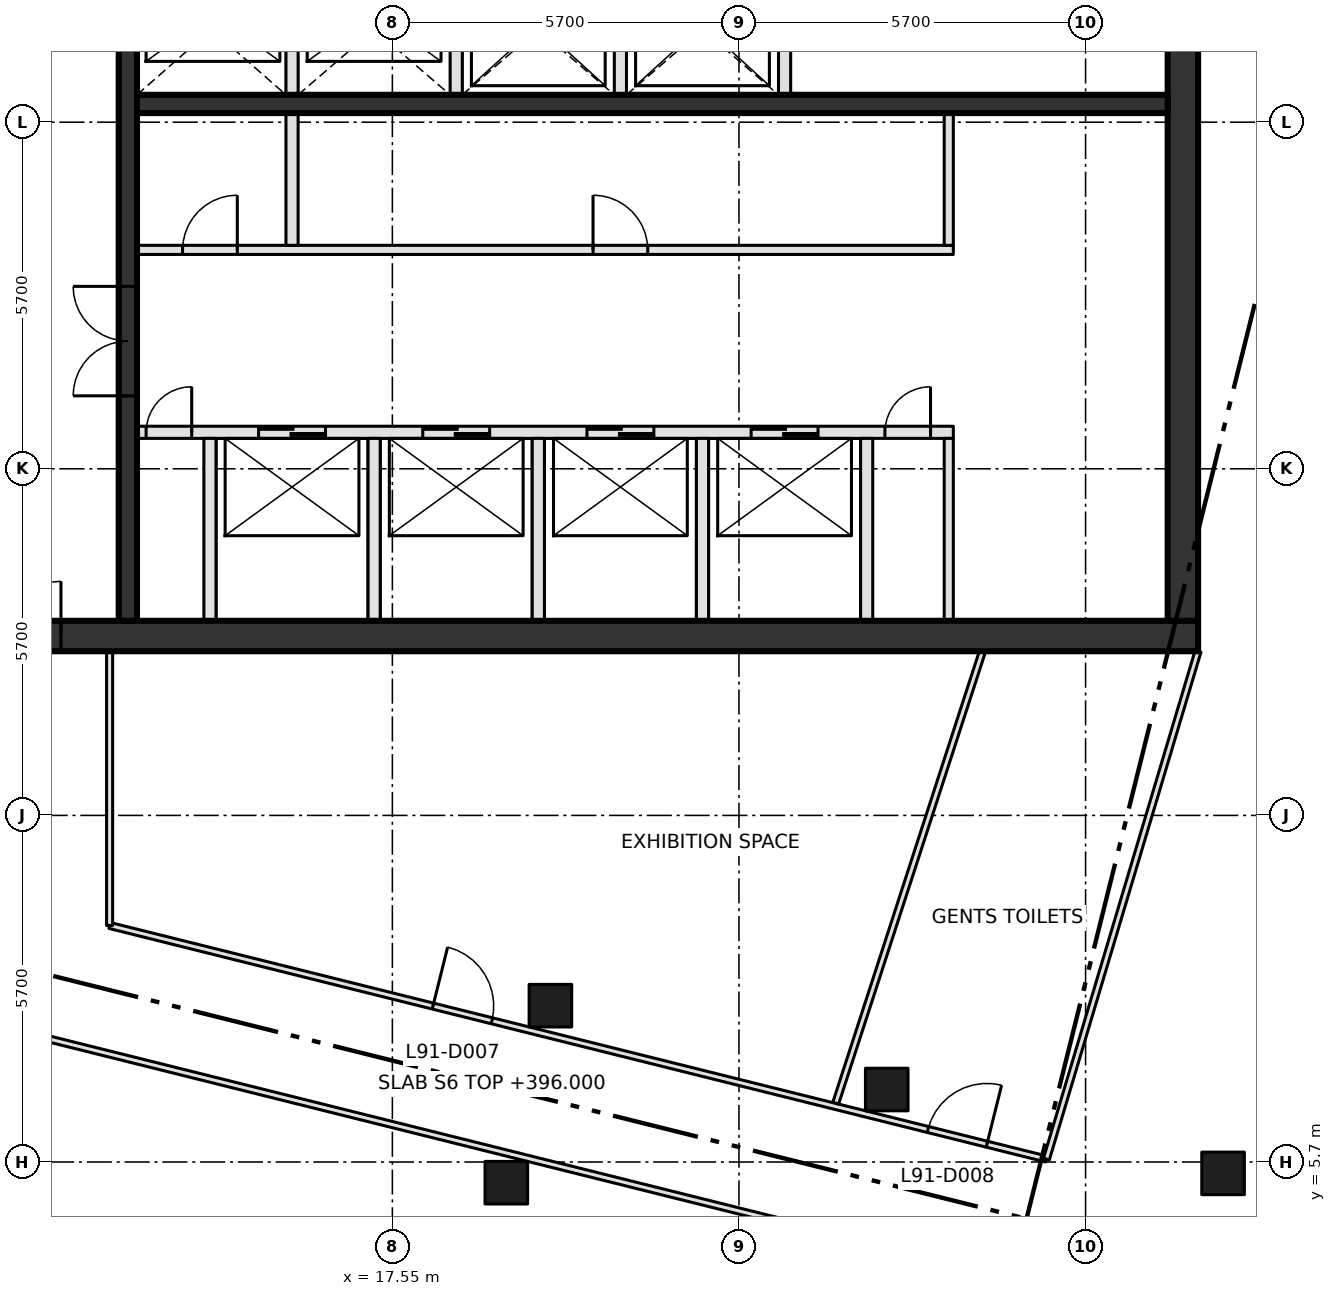
"""IFC4 building model, lengths in metres.
Left out: names, types, materials, properties, quantities, classifications, styles, units other than length and angle.
Written with IfcOpenShell. Run it as: python <this file> out.ifc"""

import sys

from ifc_helpers import new_model, si_unit, direction, frame, frame_2d, origin, origin_2d, place, context, subcontext, project, spatial, rectangle, extrude, element, fill, save


model = new_model("IFC4")
c1 = context("Model", 3, precision=1e-05, world=origin(), true_north=direction((0.0, 1.0)))
c2 = subcontext(c1, "Body", "Model", "MODEL_VIEW")
j1 = project(units=[si_unit("LENGTHUNIT", "METRE"), si_unit("PLANEANGLEUNIT", "RADIAN")], contexts=[c1])
p1 = place(None, origin())
s1 = spatial("IfcSite", under=j1, at=p1, CompositionType="ELEMENT")
p2 = place(p1, origin())
s2 = spatial("IfcBuilding", under=s1, at=p2, CompositionType="ELEMENT")
p3 = place(p2, frame((0.0, 0.0, 396.0)))
s3 = spatial("IfcBuildingStorey", under=s2, at=p3, CompositionType="ELEMENT", Elevation=396.0)
for number, where, z_axis, x_axis in (
    (1, (19.424, 5.36, 0.0), (0.0, 0.0, 1.0), (1.0, 0.0, 0.0)),
    (2, (20.149, 8.271, 0.0), (0.0, 0.0, 1.0), (1.0, 0.0, 0.0)),
    (3, (25.68, 6.892, 0.0), (0.0, 0.0, 1.0), (1.0, 0.0, 0.0)),
    (4, (31.211, 5.513, 0.0), (0.0, 0.0, 1.0), (1.0, 0.0, 0.0)),
):
    element("IfcColumn", number, at=place(p3, frame(where, z_axis=z_axis, x_axis=x_axis)), inside=s3, PredefinedType="COLUMN", context=c2, shape_type="SweptSolid", body=[
        extrude(rectangle(XDim=0.7, YDim=0.7, at=origin_2d()), origin(), (0.0, 0.0, 1.0), 4.2),
    ])
p4 = place(p3, frame((8.0, 14.35, -0.3), z_axis=(0.0, 0.0, 1.0), x_axis=(1.0, 0.0, 0.0)))
e5 = element("IfcWall", 5, at=p4, inside=s3, PredefinedType="SHEAR", context=c2, shape_type="SweptSolid", body=[
    extrude(rectangle(XDim=22.8, YDim=0.5, at=frame_2d((11.4, 0.0))), origin(), (0.0, 0.0, 1.0), 4.05),
])
p5 = place(p4, frame((2.3, 0.0, 0.3)))
e6 = element("IfcOpeningElement", 6, at=p5, cuts=e5, PredefinedType="OPENING", context=c2, shape_type="SweptSolid", body=[
    extrude(rectangle(XDim=1.8, YDim=2.1, at=frame_2d((0.9, 1.05))), frame((0.0, 0.26, 0.0), z_axis=(0.0, -1.0, 0.0), x_axis=(1.0, 0.0, 0.0)), (0.0, 0.0, 1.0), 0.52),
])
p6 = place(p3, frame((30.55, 14.6, -0.3), z_axis=(0.0, 0.0, 1.0), x_axis=(0.0, 1.0, 0.0)))
e7 = element("IfcWall", 7, at=p6, inside=s3, PredefinedType="SHEAR", context=c2, shape_type="SweptSolid", body=[
    extrude(rectangle(XDim=21.1, YDim=0.5, at=frame_2d((10.55, 0.0))), origin(), (0.0, 0.0, 1.0), 4.05),
])
p7 = place(p3, frame((13.35, 17.7, 0.0), z_axis=(0.0, 0.0, 1.0), x_axis=(1.0, 0.0, 0.0)))
e8 = element("IfcWall", 8, at=p7, inside=s3, PredefinedType="SOLIDWALL", context=c2, shape_type="SweptSolid", body=[
    extrude(rectangle(XDim=13.425, YDim=0.2, at=frame_2d((6.712, 0.0))), origin(), (0.0, 0.0, 1.0), 3.75),
])
p8 = place(p7, frame((2.0, 0.0, 0.0)))
e9 = element("IfcOpeningElement", 9, at=p8, cuts=e8, PredefinedType="OPENING", context=c2, shape_type="SweptSolid", body=[
    extrude(rectangle(XDim=1.1, YDim=2.1, at=frame_2d((0.55, 1.05))), frame((0.0, 0.11, 0.0), z_axis=(0.0, -1.0, 0.0), x_axis=(1.0, 0.0, 0.0)), (0.0, 0.0, 1.0), 0.22),
])
p9 = place(p7, frame((4.7, 0.0, 0.0)))
e10 = element("IfcOpeningElement", 10, at=p9, cuts=e8, PredefinedType="OPENING", context=c2, shape_type="SweptSolid", body=[
    extrude(rectangle(XDim=1.1, YDim=2.1, at=frame_2d((0.55, 1.05))), frame((0.0, 0.11, 0.0), z_axis=(0.0, -1.0, 0.0), x_axis=(1.0, 0.0, 0.0)), (0.0, 0.0, 1.0), 0.22),
])
p10 = place(p7, frame((7.4, 0.0, 0.0)))
e11 = element("IfcOpeningElement", 11, at=p10, cuts=e8, PredefinedType="OPENING", context=c2, shape_type="SweptSolid", body=[
    extrude(rectangle(XDim=1.1, YDim=2.1, at=frame_2d((0.55, 1.05))), frame((0.0, 0.11, 0.0), z_axis=(0.0, -1.0, 0.0), x_axis=(1.0, 0.0, 0.0)), (0.0, 0.0, 1.0), 0.22),
])
p11 = place(p7, frame((10.1, 0.0, 0.0)))
e12 = element("IfcOpeningElement", 12, at=p11, cuts=e8, PredefinedType="OPENING", context=c2, shape_type="SweptSolid", body=[
    extrude(rectangle(XDim=1.1, YDim=2.1, at=frame_2d((0.55, 1.05))), frame((0.0, 0.11, 0.0), z_axis=(0.0, -1.0, 0.0), x_axis=(1.0, 0.0, 0.0)), (0.0, 0.0, 1.0), 0.22),
])
p12 = place(p7, frame((0.15, 0.0, 0.0)))
e13 = element("IfcOpeningElement", 13, at=p12, cuts=e8, PredefinedType="OPENING", context=c2, shape_type="SweptSolid", body=[
    extrude(rectangle(XDim=0.75, YDim=2.1, at=frame_2d((0.375, 1.05))), frame((0.0, 0.11, 0.0), z_axis=(0.0, -1.0, 0.0), x_axis=(1.0, 0.0, 0.0)), (0.0, 0.0, 1.0), 0.22),
])
p13 = place(p7, frame((12.3, 0.0, 0.0)))
e14 = element("IfcOpeningElement", 14, at=p13, cuts=e8, PredefinedType="OPENING", context=c2, shape_type="SweptSolid", body=[
    extrude(rectangle(XDim=0.75, YDim=2.1, at=frame_2d((0.375, 1.05))), frame((0.0, 0.11, 0.0), z_axis=(0.0, -1.0, 0.0), x_axis=(1.0, 0.0, 0.0)), (0.0, 0.0, 1.0), 0.22),
])
p14 = place(p3, frame((13.35, 20.7, 0.0), z_axis=(0.0, 0.0, 1.0), x_axis=(1.0, 0.0, 0.0)))
e15 = element("IfcWall", 15, at=p14, inside=s3, PredefinedType="PARTITIONING", context=c2, shape_type="SweptSolid", body=[
    extrude(rectangle(XDim=13.425, YDim=0.15, at=frame_2d((6.712, 0.0))), origin(), (0.0, 0.0, 1.0), 3.75),
])
p15 = place(p14, frame((0.75, 0.0, 0.0)))
e16 = element("IfcOpeningElement", 16, at=p15, cuts=e15, PredefinedType="OPENING", context=c2, shape_type="SweptSolid", body=[
    extrude(rectangle(XDim=0.9, YDim=2.1, at=frame_2d((0.45, 1.05))), frame((0.0, 0.085, 0.0), z_axis=(0.0, -1.0, 0.0), x_axis=(1.0, 0.0, 0.0)), (0.0, 0.0, 1.0), 0.17),
])
p16 = place(p14, frame((7.5, 0.0, 0.0)))
e17 = element("IfcOpeningElement", 17, at=p16, cuts=e15, PredefinedType="OPENING", context=c2, shape_type="SweptSolid", body=[
    extrude(rectangle(XDim=0.9, YDim=2.1, at=frame_2d((0.45, 1.05))), frame((0.0, 0.085, 0.0), z_axis=(0.0, -1.0, 0.0), x_axis=(1.0, 0.0, 0.0)), (0.0, 0.0, 1.0), 0.17),
])
p17 = place(p3, frame((13.35, 23.1, 0.0), z_axis=(0.0, 0.0, 1.0), x_axis=(1.0, 0.0, 0.0)))
e18 = element("IfcWall", 18, at=p17, inside=s3, PredefinedType="SHEAR", context=c2, shape_type="SweptSolid", body=[
    extrude(rectangle(XDim=16.95, YDim=0.3, at=frame_2d((8.475, 0.0))), origin(), (0.0, 0.0, 1.0), 3.75),
])
p18 = place(p3, frame((13.2, 14.6, 0.0), z_axis=(0.0, 0.0, 1.0), x_axis=(0.0, 1.0, 0.0)))
e19 = element("IfcWall", 19, at=p18, inside=s3, PredefinedType="SHEAR", context=c2, shape_type="SweptSolid", body=[
    extrude(rectangle(XDim=21.1, YDim=0.3, at=frame_2d((10.55, 0.0))), origin(), (0.0, 0.0, 1.0), 3.75),
])
p19 = place(p18, frame((3.7, 0.0, 0.0)))
e20 = element("IfcOpeningElement", 20, at=p19, cuts=e19, PredefinedType="OPENING", context=c2, shape_type="SweptSolid", body=[
    extrude(rectangle(XDim=1.8, YDim=2.1, at=frame_2d((0.9, 1.05))), frame((0.0, 0.16, 0.0), z_axis=(0.0, -1.0, 0.0), x_axis=(1.0, 0.0, 0.0)), (0.0, 0.0, 1.0), 0.32),
])
p20 = place(p18, frame((11.8, 0.0, 0.0)))
e21 = element("IfcOpeningElement", 21, at=p20, cuts=e19, PredefinedType="OPENING", context=c2, shape_type="SweptSolid", body=[
    extrude(rectangle(XDim=1.2, YDim=2.1, at=frame_2d((0.6, 1.05))), frame((0.0, 0.16, 0.0), z_axis=(0.0, -1.0, 0.0), x_axis=(1.0, 0.0, 0.0)), (0.0, 0.0, 1.0), 0.32),
])
p21 = place(p3, frame((14.55, 14.6, 0.0), z_axis=(0.0, 0.0, 1.0), x_axis=(0.0, 1.0, 0.0)))
e22 = element("IfcWall", 22, at=p21, inside=s3, PredefinedType="SOLIDWALL", context=c2, shape_type="SweptSolid", body=[
    extrude(rectangle(XDim=3.0, YDim=0.2, at=frame_2d((1.5, 0.0))), origin(), (0.0, 0.0, 1.0), 3.75),
])
p22 = place(p3, frame((15.9, 20.775, 0.0), z_axis=(0.0, 0.0, 1.0), x_axis=(0.0, 1.0, 0.0)))
e23 = element("IfcWall", 23, at=p22, inside=s3, PredefinedType="SOLIDWALL", context=c2, shape_type="SweptSolid", body=[
    extrude(rectangle(XDim=4.625, YDim=0.2, at=frame_2d((2.312, 0.0))), origin(), (0.0, 0.0, 1.0), 3.75),
])
p23 = place(p3, frame((17.25, 14.6, 0.0), z_axis=(0.0, 0.0, 1.0), x_axis=(0.0, 1.0, 0.0)))
e24 = element("IfcWall", 24, at=p23, inside=s3, PredefinedType="SOLIDWALL", context=c2, shape_type="SweptSolid", body=[
    extrude(rectangle(XDim=3.0, YDim=0.2, at=frame_2d((1.5, 0.0))), origin(), (0.0, 0.0, 1.0), 3.75),
])
p24 = place(p3, frame((18.6, 23.25, 0.0), z_axis=(0.0, 0.0, 1.0), x_axis=(0.0, 1.0, 0.0)))
e25 = element("IfcWall", 25, at=p24, inside=s3, PredefinedType="SOLIDWALL", context=c2, shape_type="SweptSolid", body=[
    extrude(rectangle(XDim=5.15, YDim=0.2, at=frame_2d((2.575, 0.0))), origin(), (0.0, 0.0, 1.0), 3.75),
])
p25 = place(p24, frame((3.15, 0.0, 0.0)))
e26 = element("IfcOpeningElement", 26, at=p25, cuts=e25, PredefinedType="OPENING", context=c2, shape_type="SweptSolid", body=[
    extrude(rectangle(XDim=1.2, YDim=2.1, at=frame_2d((0.6, 1.05))), frame((0.0, 0.11, 0.0), z_axis=(0.0, -1.0, 0.0), x_axis=(1.0, 0.0, 0.0)), (0.0, 0.0, 1.0), 0.22),
])
p26 = place(p3, frame((19.95, 14.6, 0.0), z_axis=(0.0, 0.0, 1.0), x_axis=(0.0, 1.0, 0.0)))
e27 = element("IfcWall", 27, at=p26, inside=s3, PredefinedType="SOLIDWALL", context=c2, shape_type="SweptSolid", body=[
    extrude(rectangle(XDim=3.0, YDim=0.2, at=frame_2d((1.5, 0.0))), origin(), (0.0, 0.0, 1.0), 3.75),
])
p27 = place(p3, frame((21.3, 23.25, 0.0), z_axis=(0.0, 0.0, 1.0), x_axis=(0.0, 1.0, 0.0)))
e28 = element("IfcWall", 28, at=p27, inside=s3, PredefinedType="SOLIDWALL", context=c2, shape_type="SweptSolid", body=[
    extrude(rectangle(XDim=2.15, YDim=0.2, at=frame_2d((1.075, 0.0))), origin(), (0.0, 0.0, 1.0), 3.75),
])
p28 = place(p3, frame((22.65, 14.6, 0.0), z_axis=(0.0, 0.0, 1.0), x_axis=(0.0, 1.0, 0.0)))
e29 = element("IfcWall", 29, at=p28, inside=s3, PredefinedType="SOLIDWALL", context=c2, shape_type="SweptSolid", body=[
    extrude(rectangle(XDim=3.0, YDim=0.2, at=frame_2d((1.5, 0.0))), origin(), (0.0, 0.0, 1.0), 3.75),
])
p29 = place(p3, frame((24.0, 23.25, 0.0), z_axis=(0.0, 0.0, 1.0), x_axis=(0.0, 1.0, 0.0)))
e30 = element("IfcWall", 30, at=p29, inside=s3, PredefinedType="SOLIDWALL", context=c2, shape_type="SweptSolid", body=[
    extrude(rectangle(XDim=2.15, YDim=0.2, at=frame_2d((1.075, 0.0))), origin(), (0.0, 0.0, 1.0), 3.75),
])
p30 = place(p3, frame((25.35, 14.6, 0.0), z_axis=(0.0, 0.0, 1.0), x_axis=(0.0, 1.0, 0.0)))
e31 = element("IfcWall", 31, at=p30, inside=s3, PredefinedType="SOLIDWALL", context=c2, shape_type="SweptSolid", body=[
    extrude(rectangle(XDim=3.0, YDim=0.2, at=frame_2d((1.5, 0.0))), origin(), (0.0, 0.0, 1.0), 3.75),
])
p31 = place(p3, frame((26.7, 14.6, 0.0), z_axis=(0.0, 0.0, 1.0), x_axis=(0.0, 1.0, 0.0)))
e32 = element("IfcWall", 32, at=p31, inside=s3, PredefinedType="PARTITIONING", context=c2, shape_type="SweptSolid", body=[
    extrude(rectangle(XDim=3.0, YDim=0.15, at=frame_2d((1.5, 0.0))), origin(), (0.0, 0.0, 1.0), 3.75),
])
p32 = place(p3, frame((26.7, 20.775, 0.0), z_axis=(0.0, 0.0, 1.0), x_axis=(0.0, 1.0, 0.0)))
e33 = element("IfcWall", 33, at=p32, inside=s3, PredefinedType="PARTITIONING", context=c2, shape_type="SweptSolid", body=[
    extrude(rectangle(XDim=2.175, YDim=0.15, at=frame_2d((1.087, 0.0))), origin(), (0.0, 0.0, 1.0), 3.75),
])
p33 = place(p3, frame((8.521, 8.567, 0.0), z_axis=(0.0, 0.0, 1.0), x_axis=(0.970298072542, -0.241912485047, 0.0)))
e34 = element("IfcWall", 34, at=p33, inside=s3, PredefinedType="PARTITIONING", context=c2, shape_type="SweptSolid", body=[
    extrude(rectangle(XDim=39.274, YDim=0.1, at=frame_2d((19.637, 0.0))), origin(), (0.0, 0.0, 1.0), 3.75),
])
p34 = place(p33, frame((24.848, 0.0, 0.0)))
e35 = element("IfcOpeningElement", 35, at=p34, cuts=e34, PredefinedType="OPENING", context=c2, shape_type="SweptSolid", body=[
    extrude(rectangle(XDim=1.8, YDim=2.1, at=frame_2d((0.9, 1.05))), frame((0.0, 0.06, 0.0), z_axis=(0.0, -1.0, 0.0), x_axis=(1.0, 0.0, 0.0)), (0.0, 0.0, 1.0), 0.12),
])
p35 = place(p33, frame((30.448, 0.0, 0.0)))
e36 = element("IfcOpeningElement", 36, at=p35, cuts=e34, PredefinedType="OPENING", context=c2, shape_type="SweptSolid", body=[
    extrude(rectangle(XDim=1.0, YDim=2.1, at=frame_2d((0.5, 1.05))), frame((0.0, 0.06, 0.0), z_axis=(0.0, -1.0, 0.0), x_axis=(1.0, 0.0, 0.0)), (0.0, 0.0, 1.0), 0.12),
])
p36 = place(p3, frame((12.9, 9.59, 0.0), z_axis=(0.0, 0.0, 1.0), x_axis=(0.970296971371, -0.241916901741, 0.0)))
e37 = element("IfcWall", 37, at=p36, inside=s3, PredefinedType="PARTITIONING", context=c2, shape_type="SweptSolid", body=[
    extrude(rectangle(XDim=15.878, YDim=0.1, at=frame_2d((7.939, 0.0))), origin(), (0.0, 0.0, 1.0), 3.75),
])
p37 = place(p36, frame((5.48, 0.0, 0.0)))
e38 = element("IfcOpeningElement", 38, at=p37, cuts=e37, PredefinedType="OPENING", context=c2, shape_type="SweptSolid", body=[
    extrude(rectangle(XDim=1.0, YDim=2.1, at=frame_2d((0.5, 1.05))), frame((0.0, 0.06, 0.0), z_axis=(0.0, -1.0, 0.0), x_axis=(1.0, 0.0, 0.0)), (0.0, 0.0, 1.0), 0.12),
])
p38 = place(p36, frame((13.869, 0.0, 0.0)))
e39 = element("IfcOpeningElement", 39, at=p38, cuts=e37, PredefinedType="OPENING", context=c2, shape_type="SweptSolid", body=[
    extrude(rectangle(XDim=1.0, YDim=2.1, at=frame_2d((0.5, 1.05))), frame((0.0, 0.06, 0.0), z_axis=(0.0, -1.0, 0.0), x_axis=(1.0, 0.0, 0.0)), (0.0, 0.0, 1.0), 0.12),
])
p39 = place(p3, frame((12.9, 9.59, 0.0), z_axis=(0.0, 0.0, 1.0), x_axis=(0.0, 1.0, 0.0)))
e40 = element("IfcWall", 40, at=p39, inside=s3, PredefinedType="PARTITIONING", context=c2, shape_type="SweptSolid", body=[
    extrude(rectangle(XDim=4.51, YDim=0.1, at=frame_2d((2.255, 0.0))), origin(), (0.0, 0.0, 1.0), 3.75),
])
p40 = place(p3, frame((30.8, 14.1, 0.0), z_axis=(0.0, 0.0, 1.0), x_axis=(-0.286170650389, -0.958178667502, 0.0)))
e41 = element("IfcWall", 41, at=p40, inside=s3, PredefinedType="PARTITIONING", context=c2, shape_type="SweptSolid", body=[
    extrude(rectangle(XDim=8.716, YDim=0.1, at=frame_2d((4.358, 0.0))), origin(), (0.0, 0.0, 1.0), 3.75),
])
p41 = place(p3, frame((24.841, 6.668, 0.0), z_axis=(0.0, 0.0, 1.0), x_axis=(0.308898149954, 0.951095122979, 0.0)))
e42 = element("IfcWall", 42, at=p41, inside=s3, PredefinedType="PARTITIONING", context=c2, shape_type="SweptSolid", body=[
    extrude(rectangle(XDim=7.814, YDim=0.1, at=frame_2d((3.907, 0.0))), origin(), (0.0, 0.0, 1.0), 3.75),
])
p42 = place(p8, origin())
e43 = element("IfcDoor", 43, at=p42, inside=s3, OperationType="SLIDING_TO_LEFT", PredefinedType="DOOR", context=c2, shape_type="SweptSolid", body=[
    extrude(rectangle(XDim=1.1, YDim=2.1, at=frame_2d((0.55, 1.05))), frame((0.0, 0.025, 0.0), z_axis=(0.0, -1.0, 0.0), x_axis=(1.0, 0.0, 0.0)), (0.0, 0.0, 1.0), 0.05),
])
fill(e9, e43)
p43 = place(p9, origin())
e44 = element("IfcDoor", 44, at=p43, inside=s3, OperationType="SLIDING_TO_LEFT", PredefinedType="DOOR", context=c2, shape_type="SweptSolid", body=[
    extrude(rectangle(XDim=1.1, YDim=2.1, at=frame_2d((0.55, 1.05))), frame((0.0, 0.025, 0.0), z_axis=(0.0, -1.0, 0.0), x_axis=(1.0, 0.0, 0.0)), (0.0, 0.0, 1.0), 0.05),
])
fill(e10, e44)
p44 = place(p10, origin())
e45 = element("IfcDoor", 45, at=p44, inside=s3, OperationType="SLIDING_TO_LEFT", PredefinedType="DOOR", context=c2, shape_type="SweptSolid", body=[
    extrude(rectangle(XDim=1.1, YDim=2.1, at=frame_2d((0.55, 1.05))), frame((0.0, 0.025, 0.0), z_axis=(0.0, -1.0, 0.0), x_axis=(1.0, 0.0, 0.0)), (0.0, 0.0, 1.0), 0.05),
])
fill(e11, e45)
p45 = place(p11, origin())
e46 = element("IfcDoor", 46, at=p45, inside=s3, OperationType="SLIDING_TO_LEFT", PredefinedType="DOOR", context=c2, shape_type="SweptSolid", body=[
    extrude(rectangle(XDim=1.1, YDim=2.1, at=frame_2d((0.55, 1.05))), frame((0.0, 0.025, 0.0), z_axis=(0.0, -1.0, 0.0), x_axis=(1.0, 0.0, 0.0)), (0.0, 0.0, 1.0), 0.05),
])
fill(e12, e46)
p46 = place(p12, origin())
e47 = element("IfcDoor", 47, at=p46, inside=s3, OperationType="SINGLE_SWING_RIGHT", PredefinedType="DOOR", context=c2, shape_type="SweptSolid", body=[
    extrude(rectangle(XDim=0.75, YDim=2.1, at=frame_2d((0.375, 1.05))), frame((0.0, 0.025, 0.0), z_axis=(0.0, -1.0, 0.0), x_axis=(1.0, 0.0, 0.0)), (0.0, 0.0, 1.0), 0.05),
])
fill(e13, e47)
p47 = place(p13, origin())
e48 = element("IfcDoor", 48, at=p47, inside=s3, OperationType="SINGLE_SWING_RIGHT", PredefinedType="DOOR", context=c2, shape_type="SweptSolid", body=[
    extrude(rectangle(XDim=0.75, YDim=2.1, at=frame_2d((0.375, 1.05))), frame((0.0, 0.025, 0.0), z_axis=(0.0, -1.0, 0.0), x_axis=(1.0, 0.0, 0.0)), (0.0, 0.0, 1.0), 0.05),
])
fill(e14, e48)
p48 = place(p15, origin())
e49 = element("IfcDoor", 49, at=p48, inside=s3, OperationType="SINGLE_SWING_RIGHT", PredefinedType="DOOR", context=c2, shape_type="SweptSolid", body=[
    extrude(rectangle(XDim=0.9, YDim=2.1, at=frame_2d((0.45, 1.05))), frame((0.0, 0.025, 0.0), z_axis=(0.0, -1.0, 0.0), x_axis=(1.0, 0.0, 0.0)), (0.0, 0.0, 1.0), 0.05),
])
fill(e16, e49)
p49 = place(p16, origin())
e50 = element("IfcDoor", 50, at=p49, inside=s3, OperationType="SINGLE_SWING_LEFT", PredefinedType="DOOR", context=c2, shape_type="SweptSolid", body=[
    extrude(rectangle(XDim=0.9, YDim=2.1, at=frame_2d((0.45, 1.05))), frame((0.0, 0.025, 0.0), z_axis=(0.0, -1.0, 0.0), x_axis=(1.0, 0.0, 0.0)), (0.0, 0.0, 1.0), 0.05),
])
fill(e17, e50)
p50 = place(p19, origin())
e51 = element("IfcDoor", 51, at=p50, inside=s3, OperationType="DOUBLE_DOOR_SINGLE_SWING", PredefinedType="DOOR", context=c2, shape_type="SweptSolid", body=[
    extrude(rectangle(XDim=1.8, YDim=2.1, at=frame_2d((0.9, 1.05))), frame((0.0, 0.025, 0.0), z_axis=(0.0, -1.0, 0.0), x_axis=(1.0, 0.0, 0.0)), (0.0, 0.0, 1.0), 0.05),
])
fill(e20, e51)
p51 = place(p5, origin())
e52 = element("IfcDoor", 52, at=p51, inside=s3, OperationType="DOUBLE_DOOR_SINGLE_SWING", PredefinedType="DOOR", context=c2, shape_type="SweptSolid", body=[
    extrude(rectangle(XDim=1.8, YDim=2.1, at=frame_2d((0.9, 1.05))), frame((0.0, 0.025, 0.0), z_axis=(0.0, -1.0, 0.0), x_axis=(1.0, 0.0, 0.0)), (0.0, 0.0, 1.0), 0.05),
])
fill(e6, e52)
p52 = place(p37, origin())
e53 = element("IfcDoor", 53, at=p52, inside=s3, OperationType="SINGLE_SWING_LEFT", PredefinedType="DOOR", context=c2, shape_type="SweptSolid", body=[
    extrude(rectangle(XDim=1.0, YDim=2.1, at=frame_2d((0.5, 1.05))), frame((0.0, 0.025, 0.0), z_axis=(0.0, -1.0, 0.0), x_axis=(1.0, 0.0, 0.0)), (0.0, 0.0, 1.0), 0.05),
])
fill(e38, e53)
p53 = place(p38, origin())
e54 = element("IfcDoor", 54, at=p53, inside=s3, OperationType="SINGLE_SWING_RIGHT", PredefinedType="DOOR", context=c2, shape_type="SweptSolid", body=[
    extrude(rectangle(XDim=1.0, YDim=2.1, at=frame_2d((0.5, 1.05))), frame((0.0, 0.025, 0.0), z_axis=(0.0, -1.0, 0.0), x_axis=(1.0, 0.0, 0.0)), (0.0, 0.0, 1.0), 0.05),
])
fill(e39, e54)
save(model, sys.argv[1])
